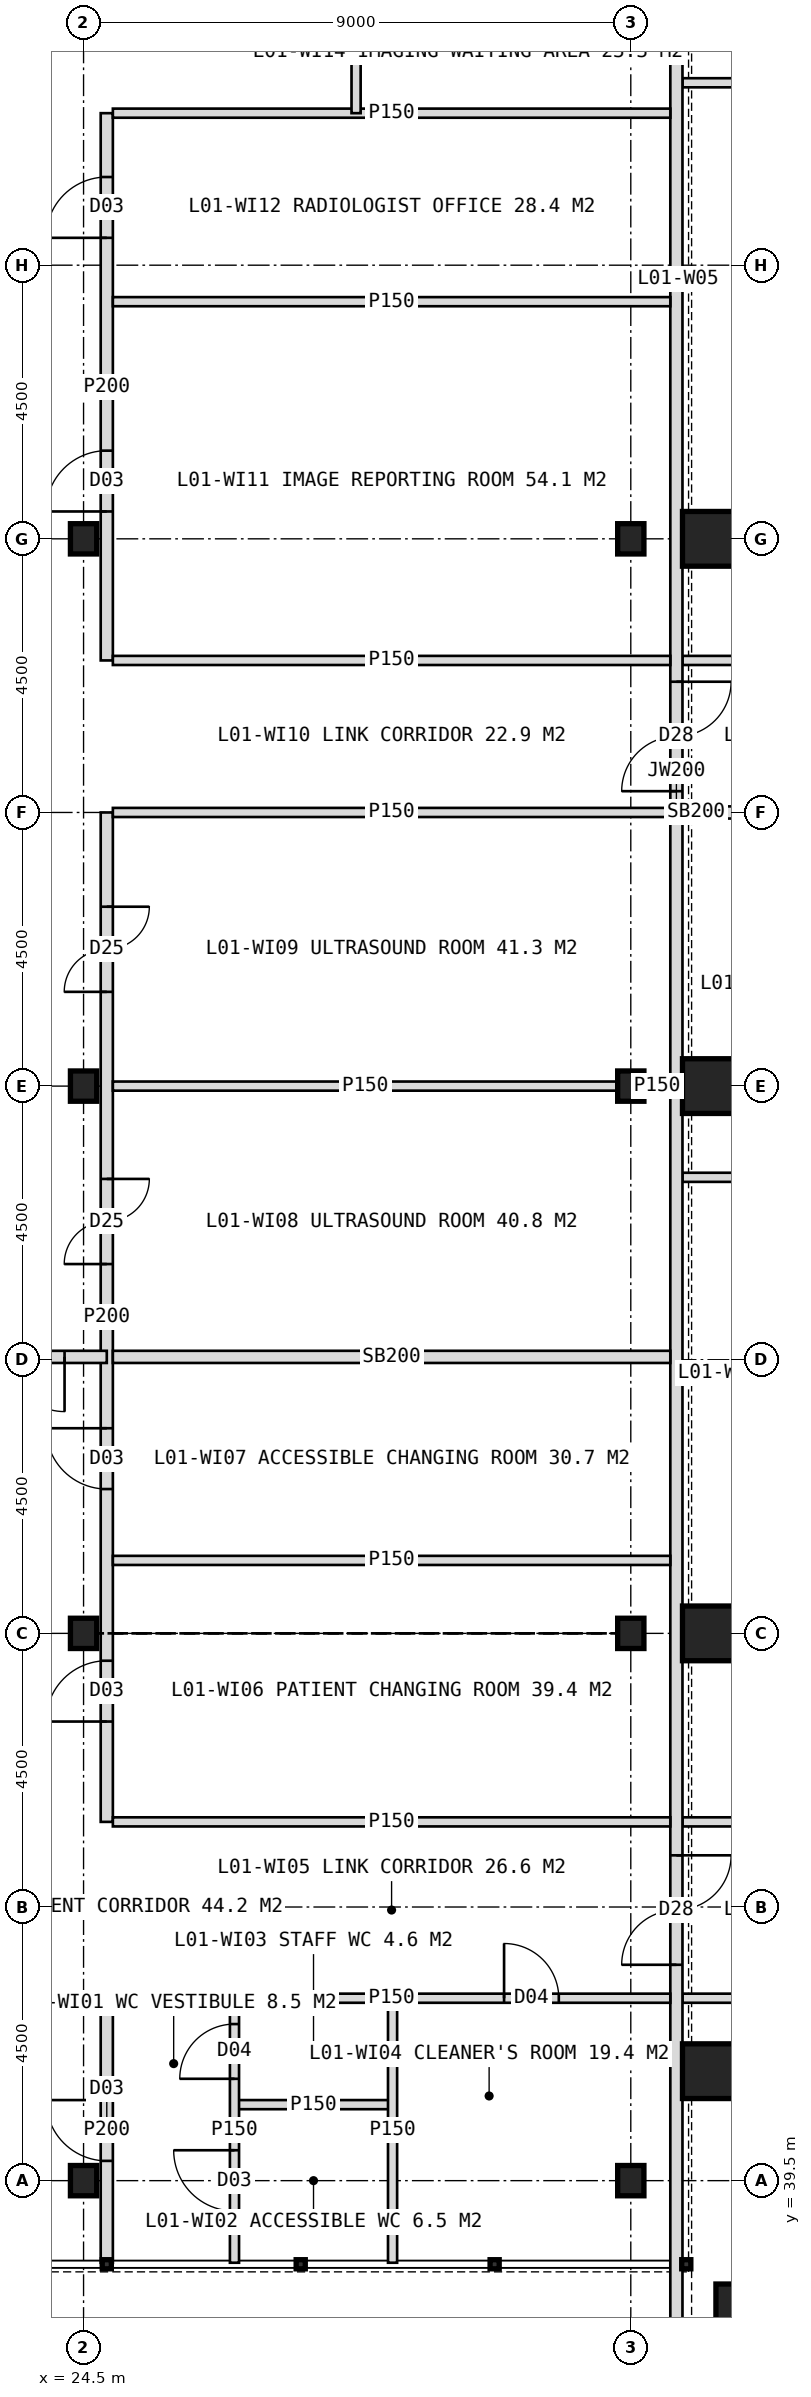
"""IFC4 building model, lengths in metres.
Left out: names, types, materials, properties, quantities, classifications, styles, units other than length and angle.
Written with IfcOpenShell. Run it as: python <this file> out.ifc"""

import sys

from ifc_helpers import new_model, si_unit, direction, frame, frame_2d, origin, origin_2d, place, context, subcontext, project, spatial, rectangle, hollow_rectangle, i_section, extrude, element, fill, save


model = new_model("IFC4")
c1 = context("Model", 3, precision=1e-05, world=origin(), true_north=direction((0.0, 1.0)))
c2 = subcontext(c1, "Body", "Model", "MODEL_VIEW")
j1 = project(units=[si_unit("LENGTHUNIT", "METRE"), si_unit("PLANEANGLEUNIT", "RADIAN")], contexts=[c1])
p1 = place(None, origin())
s1 = spatial("IfcSite", under=j1, at=p1, CompositionType="ELEMENT")
p2 = place(p1, origin())
s2 = spatial("IfcBuilding", under=s1, at=p2, CompositionType="ELEMENT")
p3 = place(p2, frame((0.0, 0.0, 6.0)))
s3 = spatial("IfcBuildingStorey", under=s2, at=p3, CompositionType="ELEMENT", Elevation=6.0)
for number, where, z_axis, x_axis in (
    (1, (34.8, 41.3, 0.0), (0.0, 0.0, 1.0), (1.0, 0.0, 0.0)),
    (2, (34.8, 48.5, 0.0), (0.0, 0.0, 1.0), (1.0, 0.0, 0.0)),
    (3, (34.8, 57.5, 0.0), (0.0, 0.0, 1.0), (1.0, 0.0, 0.0)),
    (4, (34.8, 66.5, 0.0), (0.0, 0.0, 1.0), (1.0, 0.0, 0.0)),
    (5, (35.35, 37.35, 0.0), (0.0, 0.0, 1.0), (1.0, 0.0, 0.0)),
):
    element("IfcColumn", number, at=place(p3, frame(where, z_axis=z_axis, x_axis=x_axis)), inside=s3, PredefinedType="COLUMN", context=c2, shape_type="SweptSolid", body=[
        extrude(hollow_rectangle(XDim=0.9, YDim=0.9, WallThickness=0.08, at=origin_2d()), origin(), (0.0, 0.0, 1.0), 5.0),
    ])
for number, where, z_axis, x_axis in (
    (6, (24.5, 39.5, 0.0), (0.0, 0.0, 1.0), (1.0, 0.0, 0.0)),
    (7, (24.5, 48.5, 0.0), (0.0, 0.0, 1.0), (1.0, 0.0, 0.0)),
    (8, (24.5, 57.5, 0.0), (0.0, 0.0, 1.0), (1.0, 0.0, 0.0)),
    (9, (24.5, 66.5, 0.0), (0.0, 0.0, 1.0), (1.0, 0.0, 0.0)),
    (10, (33.5, 39.5, 0.0), (0.0, 0.0, 1.0), (1.0, 0.0, 0.0)),
    (11, (33.5, 48.5, 0.0), (0.0, 0.0, 1.0), (1.0, 0.0, 0.0)),
    (12, (33.5, 57.5, 0.0), (0.0, 0.0, 1.0), (1.0, 0.0, 0.0)),
    (13, (33.5, 66.5, 0.0), (0.0, 0.0, 1.0), (1.0, 0.0, 0.0)),
):
    element("IfcColumn", number, at=place(p3, frame(where, z_axis=z_axis, x_axis=x_axis)), inside=s3, PredefinedType="COLUMN", context=c2, shape_type="SweptSolid", body=[
        extrude(i_section(OverallWidth=0.432, OverallDepth=0.498, WebThickness=0.056, FlangeThickness=0.089, FilletRadius=0.015, at=origin_2d()), origin(), (0.0, 0.0, 1.0), 5.0),
    ])
for number, where, z_axis, x_axis in (
    (14, (40.5, 42.5, 0.0), (0.0, 0.0, 1.0), (-1.0, 0.0, 0.0)),
    (15, (40.5, 45.4, 0.0), (0.0, 0.0, 1.0), (-1.0, 0.0, 0.0)),
    (16, (40.5, 56.0, 0.0), (0.0, 0.0, 1.0), (-1.0, 0.0, 0.0)),
):
    element("IfcWall", number, at=place(p3, frame(where, z_axis=z_axis, x_axis=x_axis)), inside=s3, PredefinedType="PARTITIONING", context=c2, shape_type="SweptSolid", body=[
        extrude(rectangle(XDim=6.15, YDim=0.15, at=frame_2d((3.075, 0.0))), origin(), (0.0, 0.0, 1.0), 4.7),
    ])
p4 = place(p3, frame((40.5, 62.0, 0.0), z_axis=(0.0, 0.0, 1.0), x_axis=(-1.0, 0.0, 0.0)))
e17 = element("IfcWall", 17, at=p4, inside=s3, PredefinedType="SOLIDWALL", context=c2, shape_type="SweptSolid", body=[
    extrude(rectangle(XDim=5.7, YDim=0.2, at=frame_2d((2.85, 0.0))), origin(), (0.0, 0.0, 1.0), 3.9),
])
p5 = place(p3, frame((34.8, 62.0, 0.0), z_axis=(0.0, 0.0, 1.0), x_axis=(-1.0, 0.0, 0.0)))
e18 = element("IfcWall", 18, at=p5, inside=s3, PredefinedType="SOLIDWALL", context=c2, shape_type="SweptSolid", body=[
    extrude(rectangle(XDim=0.45, YDim=0.2, at=frame_2d((0.225, 0.0))), origin(), (0.0, 0.0, 1.0), 4.7),
])
for number, where, z_axis, x_axis in (
    (19, (40.5, 64.5, 0.0), (0.0, 0.0, 1.0), (-1.0, 0.0, 0.0)),
    (20, (40.5, 74.0, 0.0), (0.0, 0.0, 1.0), (-1.0, 0.0, 0.0)),
):
    element("IfcWall", number, at=place(p3, frame(where, z_axis=z_axis, x_axis=x_axis)), inside=s3, PredefinedType="PARTITIONING", context=c2, shape_type="SweptSolid", body=[
        extrude(rectangle(XDim=6.15, YDim=0.15, at=frame_2d((3.075, 0.0))), origin(), (0.0, 0.0, 1.0), 4.7),
    ])
p6 = place(p3, frame((24.882, 38.15, 0.0), z_axis=(0.0, 0.0, 1.0), x_axis=(0.0, 1.0, 0.0)))
e21 = element("IfcWall", 21, at=p6, inside=s3, PredefinedType="PARTITIONING", context=c2, shape_type="SweptSolid", body=[
    extrude(rectangle(XDim=4.35, YDim=0.2, at=frame_2d((2.175, 0.0))), origin(), (0.0, 0.0, 1.0), 4.7),
])
p7 = place(p6, frame((1.675, 0.0, 0.0)))
e22 = element("IfcOpeningElement", 22, at=p7, cuts=e21, PredefinedType="OPENING", context=c2, shape_type="SweptSolid", body=[
    extrude(rectangle(XDim=1.0, YDim=2.1, at=frame_2d((0.5, 1.05))), frame((0.0, 0.11, 0.0), z_axis=(0.0, -1.0, 0.0), x_axis=(1.0, 0.0, 0.0)), (0.0, 0.0, 1.0), 0.22),
])
p8 = place(p3, frame((24.882, 45.4, 0.0), z_axis=(0.0, 0.0, 1.0), x_axis=(0.0, 1.0, 0.0)))
e23 = element("IfcWall", 23, at=p8, inside=s3, PredefinedType="PARTITIONING", context=c2, shape_type="SweptSolid", body=[
    extrude(rectangle(XDim=16.6, YDim=0.2, at=frame_2d((8.3, 0.0))), origin(), (0.0, 0.0, 1.0), 4.7),
])
p9 = place(p8, frame((1.65, 0.0, 0.0)))
e24 = element("IfcOpeningElement", 24, at=p9, cuts=e23, PredefinedType="OPENING", context=c2, shape_type="SweptSolid", body=[
    extrude(rectangle(XDim=1.0, YDim=2.1, at=frame_2d((0.5, 1.05))), frame((0.0, 0.11, 0.0), z_axis=(0.0, -1.0, 0.0), x_axis=(1.0, 0.0, 0.0)), (0.0, 0.0, 1.0), 0.22),
])
p10 = place(p8, frame((5.473, 0.0, 0.0)))
e25 = element("IfcOpeningElement", 25, at=p10, cuts=e23, PredefinedType="OPENING", context=c2, shape_type="SweptSolid", body=[
    extrude(rectangle(XDim=1.0, YDim=2.1, at=frame_2d((0.5, 1.05))), frame((0.0, 0.11, 0.0), z_axis=(0.0, -1.0, 0.0), x_axis=(1.0, 0.0, 0.0)), (0.0, 0.0, 1.0), 0.22),
])
p11 = place(p8, frame((9.174, 0.0, 0.0)))
e26 = element("IfcOpeningElement", 26, at=p11, cuts=e23, PredefinedType="OPENING", context=c2, shape_type="SweptSolid", body=[
    extrude(rectangle(XDim=1.4, YDim=2.2, at=frame_2d((0.7, 1.1))), frame((0.0, 0.11, 0.0), z_axis=(0.0, -1.0, 0.0), x_axis=(1.0, 0.0, 0.0)), (0.0, 0.0, 1.0), 0.22),
])
p12 = place(p8, frame((13.65, 0.0, 0.0)))
e27 = element("IfcOpeningElement", 27, at=p12, cuts=e23, PredefinedType="OPENING", context=c2, shape_type="SweptSolid", body=[
    extrude(rectangle(XDim=1.4, YDim=2.2, at=frame_2d((0.7, 1.1))), frame((0.0, 0.11, 0.0), z_axis=(0.0, -1.0, 0.0), x_axis=(1.0, 0.0, 0.0)), (0.0, 0.0, 1.0), 0.22),
])
p13 = place(p3, frame((24.882, 64.5, 0.0), z_axis=(0.0, 0.0, 1.0), x_axis=(0.0, 1.0, 0.0)))
e28 = element("IfcWall", 28, at=p13, inside=s3, PredefinedType="PARTITIONING", context=c2, shape_type="SweptSolid", body=[
    extrude(rectangle(XDim=9.0, YDim=0.2, at=frame_2d((4.5, 0.0))), origin(), (0.0, 0.0, 1.0), 4.7),
])
p14 = place(p13, frame((2.45, 0.0, 0.0)))
e29 = element("IfcOpeningElement", 29, at=p14, cuts=e28, PredefinedType="OPENING", context=c2, shape_type="SweptSolid", body=[
    extrude(rectangle(XDim=1.0, YDim=2.1, at=frame_2d((0.5, 1.05))), frame((0.0, 0.11, 0.0), z_axis=(0.0, -1.0, 0.0), x_axis=(1.0, 0.0, 0.0)), (0.0, 0.0, 1.0), 0.22),
])
p15 = place(p13, frame((6.95, 0.0, 0.0)))
e30 = element("IfcOpeningElement", 30, at=p15, cuts=e28, PredefinedType="OPENING", context=c2, shape_type="SweptSolid", body=[
    extrude(rectangle(XDim=1.0, YDim=2.1, at=frame_2d((0.5, 1.05))), frame((0.0, 0.11, 0.0), z_axis=(0.0, -1.0, 0.0), x_axis=(1.0, 0.0, 0.0)), (0.0, 0.0, 1.0), 0.22),
])
p16 = place(p3, frame((21.693, 53.047, 0.0), z_axis=(0.0, 0.0, 1.0), x_axis=(1.0, 0.0, 0.0)))
e31 = element("IfcWall", 31, at=p16, inside=s3, PredefinedType="SOLIDWALL", context=c2, shape_type="SweptSolid", body=[
    extrude(rectangle(XDim=3.189, YDim=0.2, at=frame_2d((1.594, 0.0))), origin(), (0.0, 0.0, 1.0), 4.7),
])
p17 = place(p16, frame((0.695, 0.0, 0.0)))
e32 = element("IfcOpeningElement", 32, at=p17, cuts=e31, PredefinedType="OPENING", context=c2, shape_type="SweptSolid", body=[
    extrude(rectangle(XDim=1.8, YDim=2.2, at=frame_2d((0.9, 1.1))), frame((0.0, 0.11, 0.0), z_axis=(0.0, -1.0, 0.0), x_axis=(1.0, 0.0, 0.0)), (0.0, 0.0, 1.0), 0.22),
])
p18 = place(p3, frame((34.25, 36.8, 0.0), z_axis=(0.0, 0.0, 1.0), x_axis=(0.0, 1.0, 0.0)))
e33 = element("IfcWall", 33, at=p18, inside=s3, PredefinedType="SOLIDWALL", context=c2, shape_type="SweptSolid", body=[
    extrude(rectangle(XDim=50.4, YDim=0.2, at=frame_2d((25.2, 0.0))), origin(), (0.0, 0.0, 1.0), 4.7),
])
p19 = place(p18, frame((6.25, 0.0, 0.0)))
e34 = element("IfcOpeningElement", 34, at=p19, cuts=e33, PredefinedType="OPENING", context=c2, shape_type="SweptSolid", body=[
    extrude(rectangle(XDim=1.8, YDim=2.2, at=frame_2d((0.9, 1.1))), frame((0.0, 0.11, 0.0), z_axis=(0.0, -1.0, 0.0), x_axis=(1.0, 0.0, 0.0)), (0.0, 0.0, 1.0), 0.22),
])
p20 = place(p18, frame((25.55, 0.0, 0.0)))
e35 = element("IfcOpeningElement", 35, at=p20, cuts=e33, PredefinedType="OPENING", context=c2, shape_type="SweptSolid", body=[
    extrude(rectangle(XDim=1.8, YDim=2.2, at=frame_2d((0.9, 1.1))), frame((0.0, 0.11, 0.0), z_axis=(0.0, -1.0, 0.0), x_axis=(1.0, 0.0, 0.0)), (0.0, 0.0, 1.0), 0.22),
])
p21 = place(p3, frame((26.982, 40.75, 0.0), z_axis=(0.0, 0.0, 1.0), x_axis=(1.0, 0.0, 0.0)))
e36 = element("IfcWall", 36, at=p21, inside=s3, PredefinedType="PARTITIONING", context=c2, shape_type="SweptSolid", body=[
    extrude(rectangle(XDim=2.6, YDim=0.15, at=frame_2d((1.3, 0.0))), origin(), (0.0, 0.0, 1.0), 4.7),
])
p22 = place(p3, frame((24.982, 42.5, 0.0), z_axis=(0.0, 0.0, 1.0), x_axis=(1.0, 0.0, 0.0)))
e37 = element("IfcWall", 37, at=p22, inside=s3, PredefinedType="PARTITIONING", context=c2, shape_type="SweptSolid", body=[
    extrude(rectangle(XDim=9.168, YDim=0.15, at=frame_2d((4.584, 0.0))), origin(), (0.0, 0.0, 1.0), 4.7),
])
p23 = place(p22, frame((6.434, 0.0, 0.0)))
e38 = element("IfcOpeningElement", 38, at=p23, cuts=e37, PredefinedType="OPENING", context=c2, shape_type="SweptSolid", body=[
    extrude(rectangle(XDim=0.9, YDim=2.1, at=frame_2d((0.45, 1.05))), frame((0.0, 0.085, 0.0), z_axis=(0.0, -1.0, 0.0), x_axis=(1.0, 0.0, 0.0)), (0.0, 0.0, 1.0), 0.17),
])
for number, where, z_axis, x_axis in (
    (39, (24.982, 45.4, 0.0), (0.0, 0.0, 1.0), (1.0, 0.0, 0.0)),
    (40, (24.982, 49.7, 0.0), (0.0, 0.0, 1.0), (1.0, 0.0, 0.0)),
):
    element("IfcWall", number, at=place(p3, frame(where, z_axis=z_axis, x_axis=x_axis)), inside=s3, PredefinedType="PARTITIONING", context=c2, shape_type="SweptSolid", body=[
        extrude(rectangle(XDim=9.168, YDim=0.15, at=frame_2d((4.584, 0.0))), origin(), (0.0, 0.0, 1.0), 4.7),
    ])
p24 = place(p3, frame((24.982, 53.047, 0.0), z_axis=(0.0, 0.0, 1.0), x_axis=(1.0, 0.0, 0.0)))
e41 = element("IfcWall", 41, at=p24, inside=s3, PredefinedType="SOLIDWALL", context=c2, shape_type="SweptSolid", body=[
    extrude(rectangle(XDim=9.168, YDim=0.2, at=frame_2d((4.584, 0.0))), origin(), (0.0, 0.0, 1.0), 4.7),
])
p25 = place(p3, frame((24.982, 57.5, 0.0), z_axis=(0.0, 0.0, 1.0), x_axis=(1.0, 0.0, 0.0)))
e42 = element("IfcWall", 42, at=p25, inside=s3, PredefinedType="PARTITIONING", context=c2, shape_type="SweptSolid", body=[
    extrude(rectangle(XDim=8.302, YDim=0.15, at=frame_2d((4.151, 0.0))), origin(), (0.0, 0.0, 1.0), 3.9),
])
p26 = place(p3, frame((33.716, 57.5, 0.0), z_axis=(0.0, 0.0, 1.0), x_axis=(1.0, 0.0, 0.0)))
e43 = element("IfcWall", 43, at=p26, inside=s3, PredefinedType="PARTITIONING", context=c2, shape_type="SweptSolid", body=[
    extrude(rectangle(XDim=0.434, YDim=0.15, at=frame_2d((0.217, 0.0))), origin(), (0.0, 0.0, 1.0), 4.7),
])
for number, where, z_axis, x_axis in (
    (44, (24.982, 62.0, 0.0), (0.0, 0.0, 1.0), (1.0, 0.0, 0.0)),
    (45, (24.982, 64.5, 0.0), (0.0, 0.0, 1.0), (1.0, 0.0, 0.0)),
    (46, (24.982, 70.4, 0.0), (0.0, 0.0, 1.0), (1.0, 0.0, 0.0)),
    (47, (24.982, 73.5, 0.0), (0.0, 0.0, 1.0), (1.0, 0.0, 0.0)),
):
    element("IfcWall", number, at=place(p3, frame(where, z_axis=z_axis, x_axis=x_axis)), inside=s3, PredefinedType="PARTITIONING", context=c2, shape_type="SweptSolid", body=[
        extrude(rectangle(XDim=9.168, YDim=0.15, at=frame_2d((4.584, 0.0))), origin(), (0.0, 0.0, 1.0), 4.7),
    ])
p27 = place(p3, frame((26.982, 38.15, 0.0), z_axis=(0.0, 0.0, 1.0), x_axis=(0.0, 1.0, 0.0)))
e48 = element("IfcWall", 48, at=p27, inside=s3, PredefinedType="PARTITIONING", context=c2, shape_type="SweptSolid", body=[
    extrude(rectangle(XDim=4.35, YDim=0.15, at=frame_2d((2.175, 0.0))), origin(), (0.0, 0.0, 1.0), 4.7),
])
p28 = place(p27, frame((0.85, 0.0, 0.0)))
e49 = element("IfcOpeningElement", 49, at=p28, cuts=e48, PredefinedType="OPENING", context=c2, shape_type="SweptSolid", body=[
    extrude(rectangle(XDim=1.0, YDim=2.1, at=frame_2d((0.5, 1.05))), frame((0.0, 0.085, 0.0), z_axis=(0.0, -1.0, 0.0), x_axis=(1.0, 0.0, 0.0)), (0.0, 0.0, 1.0), 0.17),
])
p29 = place(p27, frame((3.025, 0.0, 0.0)))
e50 = element("IfcOpeningElement", 50, at=p29, cuts=e48, PredefinedType="OPENING", context=c2, shape_type="SweptSolid", body=[
    extrude(rectangle(XDim=0.9, YDim=2.1, at=frame_2d((0.45, 1.05))), frame((0.0, 0.085, 0.0), z_axis=(0.0, -1.0, 0.0), x_axis=(1.0, 0.0, 0.0)), (0.0, 0.0, 1.0), 0.17),
])
p30 = place(p3, frame((28.982, 73.5, 0.0), z_axis=(0.0, 0.0, 1.0), x_axis=(0.0, 1.0, 0.0)))
e51 = element("IfcWall", 51, at=p30, inside=s3, PredefinedType="PARTITIONING", context=c2, shape_type="SweptSolid", body=[
    extrude(rectangle(XDim=4.5, YDim=0.15, at=frame_2d((2.25, 0.0))), origin(), (0.0, 0.0, 1.0), 4.7),
])
p31 = place(p30, frame((2.65, 0.0, 0.0)))
e52 = element("IfcOpeningElement", 52, at=p31, cuts=e51, PredefinedType="OPENING", context=c2, shape_type="SweptSolid", body=[
    extrude(rectangle(XDim=1.6, YDim=2.2, at=frame_2d((0.8, 1.1))), frame((0.0, 0.085, 0.0), z_axis=(0.0, -1.0, 0.0), x_axis=(1.0, 0.0, 0.0)), (0.0, 0.0, 1.0), 0.17),
])
p32 = place(p3, frame((29.582, 38.15, 0.0), z_axis=(0.0, 0.0, 1.0), x_axis=(0.0, 1.0, 0.0)))
e53 = element("IfcWall", 53, at=p32, inside=s3, PredefinedType="PARTITIONING", context=c2, shape_type="SweptSolid", body=[
    extrude(rectangle(XDim=4.35, YDim=0.15, at=frame_2d((2.175, 0.0))), origin(), (0.0, 0.0, 1.0), 4.7),
])
p33 = place(p17, origin())
e54 = element("IfcDoor", 54, at=p33, inside=s3, OperationType="DOUBLE_DOOR_DOUBLE_SWING", PredefinedType="DOOR", context=c2, shape_type="SweptSolid", body=[
    extrude(rectangle(XDim=1.8, YDim=2.2, at=frame_2d((0.9, 1.1))), frame((0.0, 0.025, 0.0), z_axis=(0.0, -1.0, 0.0), x_axis=(1.0, 0.0, 0.0)), (0.0, 0.0, 1.0), 0.05),
])
fill(e32, e54)
p34 = place(p19, origin())
e55 = element("IfcDoor", 55, at=p34, inside=s3, OperationType="DOUBLE_DOOR_SINGLE_SWING", PredefinedType="DOOR", context=c2, shape_type="SweptSolid", body=[
    extrude(rectangle(XDim=1.8, YDim=2.2, at=frame_2d((0.9, 1.1))), frame((0.0, 0.025, 0.0), z_axis=(0.0, -1.0, 0.0), x_axis=(1.0, 0.0, 0.0)), (0.0, 0.0, 1.0), 0.05),
])
fill(e34, e55)
p35 = place(p20, origin())
e56 = element("IfcDoor", 56, at=p35, inside=s3, OperationType="DOUBLE_DOOR_SINGLE_SWING", PredefinedType="DOOR", context=c2, shape_type="SweptSolid", body=[
    extrude(rectangle(XDim=1.8, YDim=2.2, at=frame_2d((0.9, 1.1))), frame((0.0, 0.025, 0.0), z_axis=(0.0, -1.0, 0.0), x_axis=(1.0, 0.0, 0.0)), (0.0, 0.0, 1.0), 0.05),
])
fill(e35, e56)
p36 = place(p7, origin())
e57 = element("IfcDoor", 57, at=p36, inside=s3, OperationType="SINGLE_SWING_RIGHT", PredefinedType="DOOR", context=c2, shape_type="SweptSolid", body=[
    extrude(rectangle(XDim=1.0, YDim=2.1, at=frame_2d((0.5, 1.05))), frame((0.0, 0.025, 0.0), z_axis=(0.0, -1.0, 0.0), x_axis=(1.0, 0.0, 0.0)), (0.0, 0.0, 1.0), 0.05),
])
fill(e22, e57)
p37 = place(p28, origin())
e58 = element("IfcDoor", 58, at=p37, inside=s3, OperationType="SINGLE_SWING_RIGHT", PredefinedType="DOOR", context=c2, shape_type="SweptSolid", body=[
    extrude(rectangle(XDim=1.0, YDim=2.1, at=frame_2d((0.5, 1.05))), frame((0.0, 0.025, 0.0), z_axis=(0.0, -1.0, 0.0), x_axis=(1.0, 0.0, 0.0)), (0.0, 0.0, 1.0), 0.05),
])
fill(e49, e58)
p38 = place(p29, origin())
e59 = element("IfcDoor", 59, at=p38, inside=s3, OperationType="SINGLE_SWING_LEFT", PredefinedType="DOOR", context=c2, shape_type="SweptSolid", body=[
    extrude(rectangle(XDim=0.9, YDim=2.1, at=frame_2d((0.45, 1.05))), frame((0.0, 0.025, 0.0), z_axis=(0.0, -1.0, 0.0), x_axis=(1.0, 0.0, 0.0)), (0.0, 0.0, 1.0), 0.05),
])
fill(e50, e59)
p39 = place(p23, origin())
e60 = element("IfcDoor", 60, at=p39, inside=s3, OperationType="SINGLE_SWING_LEFT", PredefinedType="DOOR", context=c2, shape_type="SweptSolid", body=[
    extrude(rectangle(XDim=0.9, YDim=2.1, at=frame_2d((0.45, 1.05))), frame((0.0, 0.025, 0.0), z_axis=(0.0, -1.0, 0.0), x_axis=(1.0, 0.0, 0.0)), (0.0, 0.0, 1.0), 0.05),
])
fill(e38, e60)
p40 = place(p9, origin())
e61 = element("IfcDoor", 61, at=p40, inside=s3, OperationType="SINGLE_SWING_LEFT", PredefinedType="DOOR", context=c2, shape_type="SweptSolid", body=[
    extrude(rectangle(XDim=1.0, YDim=2.1, at=frame_2d((0.5, 1.05))), frame((0.0, 0.025, 0.0), z_axis=(0.0, -1.0, 0.0), x_axis=(1.0, 0.0, 0.0)), (0.0, 0.0, 1.0), 0.05),
])
fill(e24, e61)
p41 = place(p10, origin())
e62 = element("IfcDoor", 62, at=p41, inside=s3, OperationType="SINGLE_SWING_RIGHT", PredefinedType="DOOR", context=c2, shape_type="SweptSolid", body=[
    extrude(rectangle(XDim=1.0, YDim=2.1, at=frame_2d((0.5, 1.05))), frame((0.0, 0.025, 0.0), z_axis=(0.0, -1.0, 0.0), x_axis=(1.0, 0.0, 0.0)), (0.0, 0.0, 1.0), 0.05),
])
fill(e25, e62)
p42 = place(p11, origin())
e63 = element("IfcDoor", 63, at=p42, inside=s3, OperationType="DOUBLE_DOOR_SINGLE_SWING", PredefinedType="DOOR", context=c2, shape_type="SweptSolid", body=[
    extrude(rectangle(XDim=1.4, YDim=2.2, at=frame_2d((0.7, 1.1))), frame((0.0, 0.025, 0.0), z_axis=(0.0, -1.0, 0.0), x_axis=(1.0, 0.0, 0.0)), (0.0, 0.0, 1.0), 0.05),
])
fill(e26, e63)
p43 = place(p12, origin())
e64 = element("IfcDoor", 64, at=p43, inside=s3, OperationType="DOUBLE_DOOR_SINGLE_SWING", PredefinedType="DOOR", context=c2, shape_type="SweptSolid", body=[
    extrude(rectangle(XDim=1.4, YDim=2.2, at=frame_2d((0.7, 1.1))), frame((0.0, 0.025, 0.0), z_axis=(0.0, -1.0, 0.0), x_axis=(1.0, 0.0, 0.0)), (0.0, 0.0, 1.0), 0.05),
])
fill(e27, e64)
p44 = place(p14, origin())
e65 = element("IfcDoor", 65, at=p44, inside=s3, OperationType="SINGLE_SWING_LEFT", PredefinedType="DOOR", context=c2, shape_type="SweptSolid", body=[
    extrude(rectangle(XDim=1.0, YDim=2.1, at=frame_2d((0.5, 1.05))), frame((0.0, 0.025, 0.0), z_axis=(0.0, -1.0, 0.0), x_axis=(1.0, 0.0, 0.0)), (0.0, 0.0, 1.0), 0.05),
])
fill(e29, e65)
p45 = place(p15, origin())
e66 = element("IfcDoor", 66, at=p45, inside=s3, OperationType="SINGLE_SWING_LEFT", PredefinedType="DOOR", context=c2, shape_type="SweptSolid", body=[
    extrude(rectangle(XDim=1.0, YDim=2.1, at=frame_2d((0.5, 1.05))), frame((0.0, 0.025, 0.0), z_axis=(0.0, -1.0, 0.0), x_axis=(1.0, 0.0, 0.0)), (0.0, 0.0, 1.0), 0.05),
])
fill(e30, e66)
save(model, sys.argv[1])
